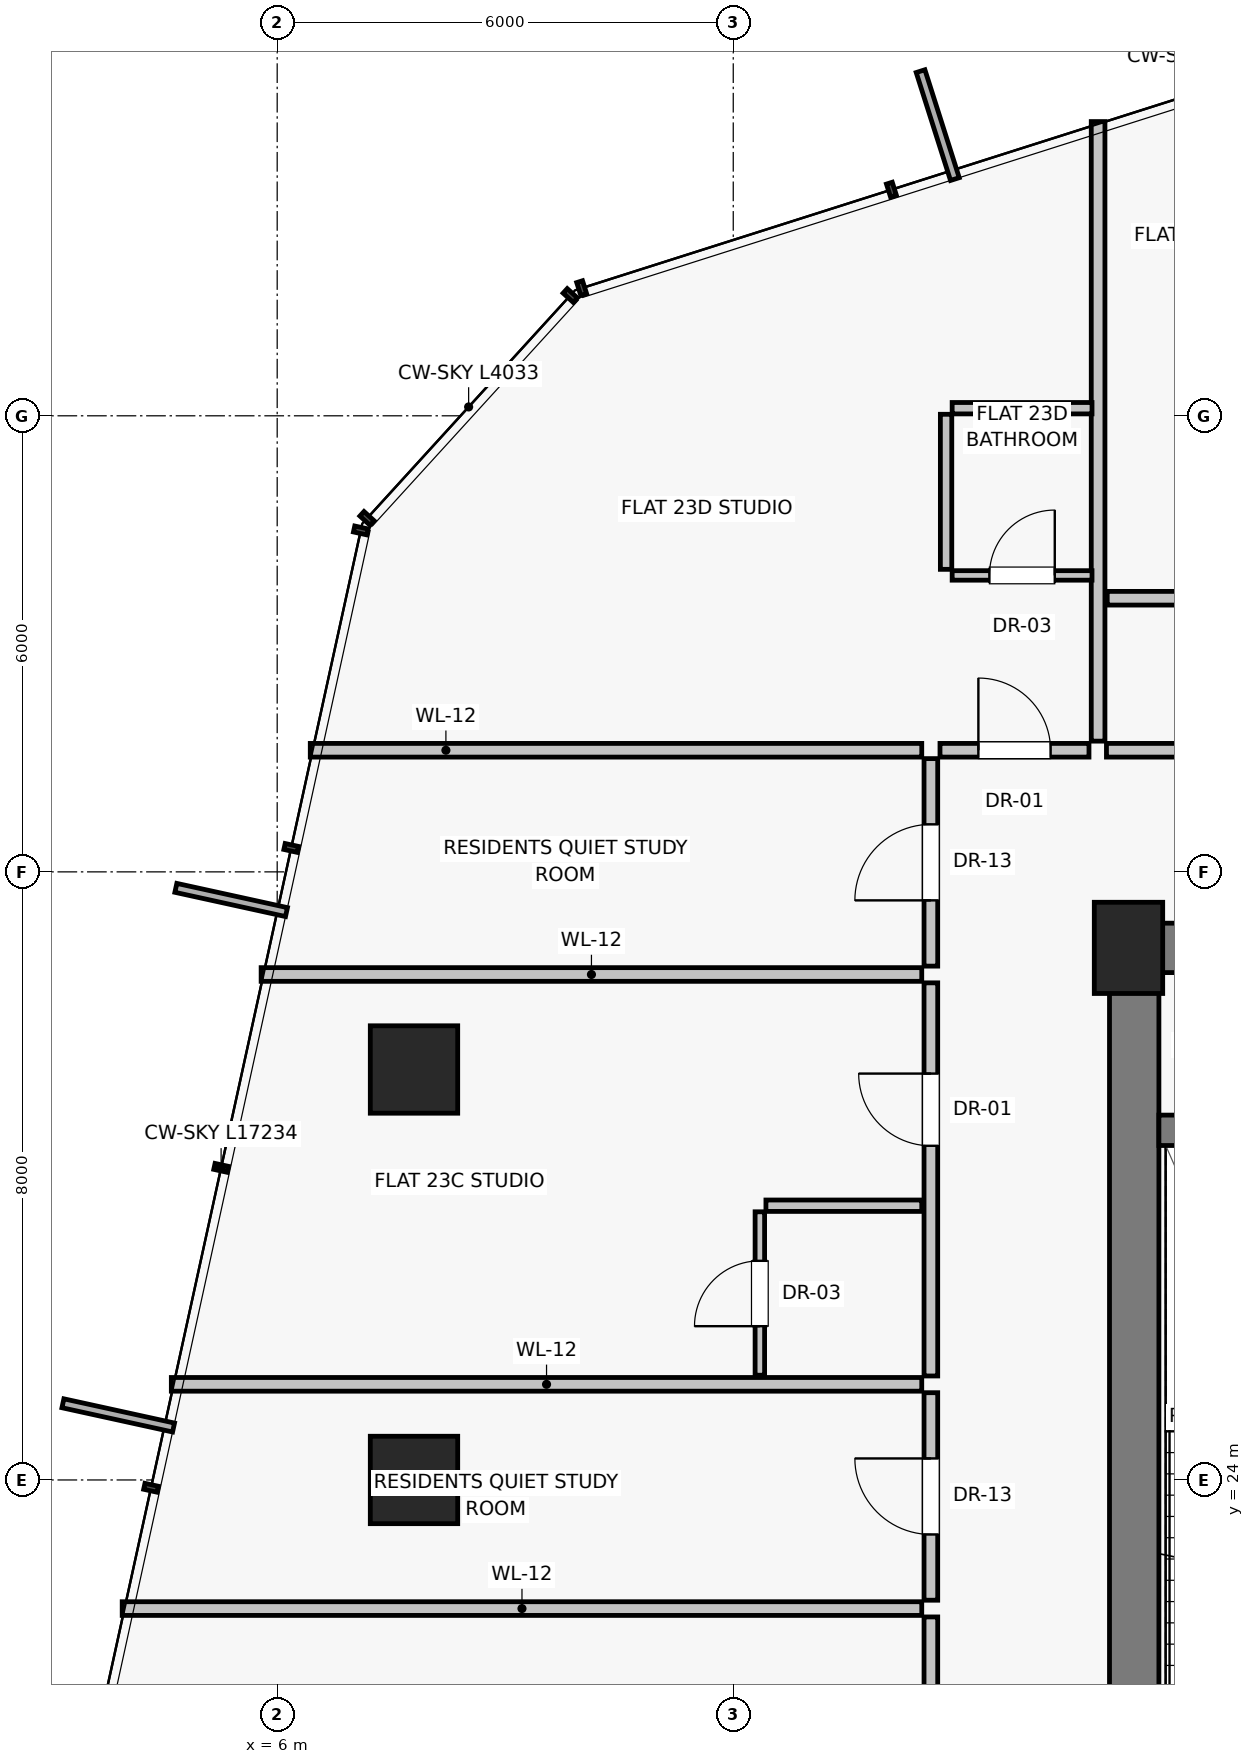
"""IFC4 building model, lengths in metres.
Left out: names, types, materials, properties, quantities, classifications, styles, units other than length and angle.
Written with IfcOpenShell. Run it as: python <this file> out.ifc"""

import sys

from ifc_helpers import new_model, si_unit, direction, frame, frame_2d, origin, origin_2d, place, context, subcontext, project, spatial, rectangle, extrude, source, transform, mapped, element, fill, save


model = new_model("IFC4")
c1 = context("Model", 3, precision=1e-05, world=origin(), true_north=direction((0.0, 1.0)))
c2 = subcontext(c1, "Body", "Model", "MODEL_VIEW")
j1 = project(units=[si_unit("LENGTHUNIT", "METRE"), si_unit("PLANEANGLEUNIT", "RADIAN")], contexts=[c1])
p1 = place(None, origin())
s1 = spatial("IfcSite", under=j1, at=p1, CompositionType="ELEMENT")
p2 = place(p1, origin())
s2 = spatial("IfcBuilding", under=s1, at=p2, CompositionType="ELEMENT")
p3 = place(p2, frame((0.0, 0.0, 85.15)))
s3 = spatial("IfcBuildingStorey", under=s2, at=p3, CompositionType="ELEMENT", Elevation=85.15)
p4 = place(p3, frame((17.2, 31.0, 0.0), z_axis=(0.0, 0.0, 1.0), x_axis=(1.0, 0.0, 0.0)))
e1 = element("IfcColumn", 1, at=p4, inside=s3, PredefinedType="PILASTER", context=c2, shape_type="SweptSolid", body=[
    extrude(rectangle(XDim=0.9, YDim=1.2, at=origin_2d()), origin(), (0.0, 0.0, 1.0), 4.3),
])
for number, where, z_axis, x_axis in (
    (2, (7.8, 29.4, -0.32), (0.0, 0.0, 1.0), (1.0, 0.0, 0.0)),
    (3, (7.8, 24.0, -0.32), (0.0, 0.0, 1.0), (1.0, 0.0, 0.0)),
):
    element("IfcColumn", number, at=place(p3, frame(where, z_axis=z_axis, x_axis=x_axis)), inside=s3, PredefinedType="COLUMN", context=c2, shape_type="SweptSolid", body=[
        extrude(rectangle(XDim=1.15, YDim=1.15, at=origin_2d()), origin(), (0.0, 0.0, 1.0), 4.62),
    ])
p5 = place(p3, frame((17.275, 16.8, 0.0), z_axis=(0.0, 0.0, 1.0), x_axis=(0.0, 1.0, 0.0)))
e4 = element("IfcWall", 4, at=p5, inside=s3, PredefinedType="SHEAR", context=c2, shape_type="SweptSolid", body=[
    extrude(rectangle(XDim=14.2, YDim=0.65, at=frame_2d((7.1, 0.0))), origin(), (0.0, 0.0, 1.0), 4.05),
])
p6 = place(p3, frame((17.2, 31.0, 0.0), z_axis=(0.0, 0.0, 1.0), x_axis=(1.0, 0.0, 0.0)))
e5 = element("IfcWall", 5, at=p6, inside=s3, PredefinedType="SHEAR", context=c2, shape_type="SweptSolid", body=[
    extrude(rectangle(XDim=3.8, YDim=0.65, at=frame_2d((1.9, 0.0))), origin(), (0.0, 0.0, 1.0), 4.05),
])
p7 = place(p6, frame((1.25, 0.0, 0.0)))
e6 = element("IfcOpeningElement", 6, at=p7, cuts=e5, PredefinedType="OPENING", context=c2, shape_type="SweptSolid", body=[
    extrude(rectangle(XDim=0.86, YDim=2.01, at=frame_2d((0.43, 1.005))), frame((0.0, 0.335, 0.0), z_axis=(0.0, -1.0, 0.0), x_axis=(1.0, 0.0, 0.0)), (0.0, 0.0, 1.0), 0.67),
])
p8 = place(p3, frame((17.6, 28.6, 0.0), z_axis=(0.0, 0.0, 1.0), x_axis=(1.0, 0.0, 0.0)))
e7 = element("IfcWall", 7, at=p8, inside=s3, PredefinedType="SHEAR", context=c2, shape_type="SweptSolid", body=[
    extrude(rectangle(XDim=3.4, YDim=0.4, at=frame_2d((1.7, 0.0))), origin(), (0.0, 0.0, 1.0), 4.05),
])
p9 = place(p3, frame((16.8, 33.72, 0.0), z_axis=(0.0, 0.0, 1.0), x_axis=(0.0, 1.0, 0.0)))
e8 = element("IfcWall", 8, at=p9, inside=s3, PredefinedType="PARTITIONING", context=c2, shape_type="SweptSolid", body=[
    extrude(rectangle(XDim=8.151, YDim=0.18, at=frame_2d((4.075, 0.0))), origin(), (0.0, 0.0, 1.0), 4.05),
])
p10 = place(p3, frame((16.91, 33.6, 0.0), z_axis=(0.0, 0.0, 1.0), x_axis=(1.0, 0.0, 0.0)))
e9 = element("IfcWall", 9, at=p10, inside=s3, PredefinedType="PARTITIONING", context=c2, shape_type="SweptSolid", body=[
    extrude(rectangle(XDim=4.1, YDim=0.18, at=frame_2d((2.05, 0.0))), origin(), (0.0, 0.0, 1.0), 4.05),
])
p11 = place(p10, frame((1.55, 0.0, 0.0)))
e10 = element("IfcOpeningElement", 10, at=p11, cuts=e9, PredefinedType="OPENING", context=c2, shape_type="SweptSolid", body=[
    extrude(rectangle(XDim=1.0, YDim=2.01, at=frame_2d((0.5, 1.005))), frame((0.0, 0.1, 0.0), z_axis=(0.0, -1.0, 0.0), x_axis=(1.0, 0.0, 0.0)), (0.0, 0.0, 1.0), 0.2),
])
p12 = place(p3, frame((16.92, 35.6, 0.0), z_axis=(0.0, 0.0, 1.0), x_axis=(1.0, 0.0, 0.0)))
e11 = element("IfcWall", 11, at=p12, inside=s3, PredefinedType="PARTITIONING", context=c2, shape_type="SweptSolid", body=[
    extrude(rectangle(XDim=4.1, YDim=0.18, at=frame_2d((2.05, 0.0))), origin(), (0.0, 0.0, 1.0), 3.63),
])
p13 = place(p3, frame((14.48, 33.6, 0.0), z_axis=(0.0, 0.0, 1.0), x_axis=(-1.0, 0.0, 0.0)))
e12 = element("IfcWall", 12, at=p13, inside=s3, PredefinedType="PARTITIONING", context=c2, shape_type="SweptSolid", body=[
    extrude(rectangle(XDim=8.045, YDim=0.18, at=frame_2d((4.022, 0.0))), origin(), (0.0, 0.0, 1.0), 4.05),
])
p14 = place(p3, frame((14.6, 22.418, 0.0), z_axis=(0.0, 0.0, 1.0), x_axis=(0.0, 1.0, 0.0)))
e13 = element("IfcWall", 13, at=p14, inside=s3, PredefinedType="PARTITIONING", context=c2, shape_type="SweptSolid", body=[
    extrude(rectangle(XDim=2.73, YDim=0.18, at=frame_2d((1.365, 0.0))), origin(), (0.0, 0.0, 1.0), 4.05),
])
p15 = place(p14, frame((0.865, 0.0, 0.0)))
e14 = element("IfcOpeningElement", 14, at=p15, cuts=e13, PredefinedType="OPENING", context=c2, shape_type="SweptSolid", body=[
    extrude(rectangle(XDim=1.0, YDim=2.01, at=frame_2d((0.5, 1.005))), frame((0.0, 0.1, 0.0), z_axis=(0.0, -1.0, 0.0), x_axis=(1.0, 0.0, 0.0)), (0.0, 0.0, 1.0), 0.2),
])
p16 = place(p3, frame((14.48, 22.308, 0.0), z_axis=(0.0, 0.0, 1.0), x_axis=(-1.0, 0.0, 0.0)))
e15 = element("IfcWall", 15, at=p16, inside=s3, PredefinedType="PARTITIONING", context=c2, shape_type="SweptSolid", body=[
    extrude(rectangle(XDim=10.519, YDim=0.18, at=frame_2d((5.26, 0.0))), origin(), (0.0, 0.0, 1.0), 4.05),
])
p17 = place(p3, frame((14.6, 14.31, 0.0), z_axis=(0.0, 0.0, 1.0), x_axis=(0.0, 1.0, 0.0)))
e16 = element("IfcWall", 16, at=p17, inside=s3, PredefinedType="PARTITIONING", context=c2, shape_type="SweptSolid", body=[
    extrude(rectangle(XDim=7.888, YDim=0.18, at=frame_2d((3.944, 0.0))), origin(), (0.0, 0.0, 1.0), 4.05),
])
p18 = place(p17, frame((5.038, 0.0, 0.0)))
e17 = element("IfcOpeningElement", 17, at=p18, cuts=e16, PredefinedType="OPENING", context=c2, shape_type="SweptSolid", body=[
    extrude(rectangle(XDim=0.95, YDim=2.02, at=frame_2d((0.475, 1.01))), frame((0.0, 0.1, 0.0), z_axis=(0.0, -1.0, 0.0), x_axis=(1.0, 0.0, 0.0)), (0.0, 0.0, 1.0), 0.2),
])
p19 = place(p3, frame((14.48, 25.258, 0.0), z_axis=(0.0, 0.0, 1.0), x_axis=(-1.0, 0.0, 0.0)))
e18 = element("IfcWall", 18, at=p19, inside=s3, PredefinedType="PARTITIONING", context=c2, shape_type="SweptSolid", body=[
    extrude(rectangle(XDim=9.873, YDim=0.18, at=frame_2d((4.936, 0.0))), origin(), (0.0, 0.0, 1.0), 4.05),
])
p20 = place(p3, frame((14.6, 30.76, 0.0), z_axis=(0.0, 0.0, 1.0), x_axis=(0.0, 1.0, 0.0)))
e19 = element("IfcWall", 19, at=p20, inside=s3, PredefinedType="PARTITIONING", context=c2, shape_type="SweptSolid", body=[
    extrude(rectangle(XDim=2.73, YDim=0.18, at=frame_2d((1.365, 0.0))), origin(), (0.0, 0.0, 1.0), 4.05),
])
p21 = place(p20, frame((0.865, 0.0, 0.0)))
e20 = element("IfcOpeningElement", 20, at=p21, cuts=e19, PredefinedType="OPENING", context=c2, shape_type="SweptSolid", body=[
    extrude(rectangle(XDim=1.0, YDim=2.01, at=frame_2d((0.5, 1.005))), frame((0.0, 0.1, 0.0), z_axis=(0.0, -1.0, 0.0), x_axis=(1.0, 0.0, 0.0)), (0.0, 0.0, 1.0), 0.2),
])
p22 = place(p3, frame((14.48, 30.65, 0.0), z_axis=(0.0, 0.0, 1.0), x_axis=(-1.0, 0.0, 0.0)))
e21 = element("IfcWall", 21, at=p22, inside=s3, PredefinedType="PARTITIONING", context=c2, shape_type="SweptSolid", body=[
    extrude(rectangle(XDim=8.691, YDim=0.18, at=frame_2d((4.346, 0.0))), origin(), (0.0, 0.0, 1.0), 3.428),
])
p23 = place(p3, frame((14.6, 25.368, 0.0), z_axis=(0.0, 0.0, 1.0), x_axis=(0.0, 1.0, 0.0)))
e22 = element("IfcWall", 22, at=p23, inside=s3, PredefinedType="PARTITIONING", context=c2, shape_type="SweptSolid", body=[
    extrude(rectangle(XDim=5.172, YDim=0.18, at=frame_2d((2.586, 0.0))), origin(), (0.0, 0.0, 1.0), 4.05),
])
p24 = place(p23, frame((3.028, 0.0, 0.0)))
e23 = element("IfcOpeningElement", 23, at=p24, cuts=e22, PredefinedType="OPENING", context=c2, shape_type="SweptSolid", body=[
    extrude(rectangle(XDim=0.95, YDim=2.02, at=frame_2d((0.475, 1.01))), frame((0.0, 0.1, 0.0), z_axis=(0.0, -1.0, 0.0), x_axis=(1.0, 0.0, 0.0)), (0.0, 0.0, 1.0), 0.2),
])
p25 = place(p3, frame((14.48, 27.608, 0.0), z_axis=(0.0, 0.0, 1.0), x_axis=(-1.0, 0.0, 0.0)))
e24 = element("IfcWall", 24, at=p25, inside=s3, PredefinedType="PARTITIONING", context=c2, shape_type="SweptSolid", body=[
    extrude(rectangle(XDim=2.05, YDim=0.15, at=frame_2d((1.025, 0.0))), origin(), (0.0, 0.0, 1.0), 4.05),
])
p26 = place(p3, frame((12.35, 25.378, 0.0), z_axis=(0.0, 0.0, 1.0), x_axis=(0.0, 1.0, 0.0)))
e25 = element("IfcWall", 25, at=p26, inside=s3, PredefinedType="PARTITIONING", context=c2, shape_type="SweptSolid", body=[
    extrude(rectangle(XDim=2.15, YDim=0.125, at=frame_2d((1.075, 0.0))), origin(), (0.0, 0.0, 1.0), 3.63),
])
p27 = place(p26, frame((0.645, 0.0, 0.0)))
e26 = element("IfcOpeningElement", 26, at=p27, cuts=e25, PredefinedType="OPENING", context=c2, shape_type="SweptSolid", body=[
    extrude(rectangle(XDim=0.86, YDim=2.01, at=frame_2d((0.43, 1.005))), frame((0.0, 0.073, 0.0), z_axis=(0.0, -1.0, 0.0), x_axis=(1.0, 0.0, 0.0)), (0.0, 0.0, 1.0), 0.145),
])
p28 = place(p3, frame((14.72, 33.6, 0.0), z_axis=(0.0, 0.0, 1.0), x_axis=(1.0, 0.0, 0.0)))
e27 = element("IfcWall", 27, at=p28, inside=s3, PredefinedType="PARTITIONING", context=c2, shape_type="SweptSolid", body=[
    extrude(rectangle(XDim=1.96, YDim=0.18, at=frame_2d((0.98, 0.0))), origin(), (0.0, 0.0, 1.0), 4.05),
])
p29 = place(p28, frame((0.505, 0.0, 0.0)))
e28 = element("IfcOpeningElement", 28, at=p29, cuts=e27, PredefinedType="OPENING", context=c2, shape_type="SweptSolid", body=[
    extrude(rectangle(XDim=0.95, YDim=2.02, at=frame_2d((0.475, 1.01))), frame((0.0, 0.1, 0.0), z_axis=(0.0, -1.0, 0.0), x_axis=(1.0, 0.0, 0.0)), (0.0, 0.0, 1.0), 0.2),
])
p30 = place(p3, frame((14.88, 35.9, 0.0), z_axis=(0.0, 0.0, 1.0), x_axis=(1.0, 0.0, 0.0)))
e29 = element("IfcWall", 29, at=p30, inside=s3, PredefinedType="PARTITIONING", context=c2, shape_type="SweptSolid", body=[
    extrude(rectangle(XDim=1.84, YDim=0.125, at=frame_2d((0.92, 0.0))), origin(), (0.0, 0.0, 1.0), 4.05),
])
p31 = place(p30, frame((0.49, 0.0, 0.0)))
e30 = element("IfcOpeningElement", 30, at=p31, cuts=e29, PredefinedType="OPENING", context=c2, shape_type="SweptSolid", body=[
    extrude(rectangle(XDim=0.86, YDim=2.01, at=frame_2d((0.43, 1.005))), frame((0.0, 0.073, 0.0), z_axis=(0.0, -1.0, 0.0), x_axis=(1.0, 0.0, 0.0)), (0.0, 0.0, 1.0), 0.145),
])
p32 = place(p3, frame((14.88, 38.1, 0.0), z_axis=(0.0, 0.0, 1.0), x_axis=(1.0, 0.0, 0.0)))
e31 = element("IfcWall", 31, at=p32, inside=s3, PredefinedType="PARTITIONING", context=c2, shape_type="SweptSolid", body=[
    extrude(rectangle(XDim=1.84, YDim=0.15, at=frame_2d((0.92, 0.0))), origin(), (0.0, 0.0, 1.0), 4.05),
])
p33 = place(p3, frame((14.8, 35.98, 0.0), z_axis=(0.0, 0.0, 1.0), x_axis=(0.0, 1.0, 0.0)))
e32 = element("IfcWall", 32, at=p33, inside=s3, PredefinedType="PARTITIONING", context=c2, shape_type="SweptSolid", body=[
    extrude(rectangle(XDim=2.04, YDim=0.15, at=frame_2d((1.02, 0.0))), origin(), (0.0, 0.0, 1.0), 4.05),
])
m1 = source(origin(), c2, "Body", "SweptSolid", [
    extrude(rectangle(XDim=1.0, YDim=2.01, at=frame_2d((0.5, 1.005))), frame((0.0, 0.025, 0.0), z_axis=(0.0, -1.0, 0.0), x_axis=(1.0, 0.0, 0.0)), (0.0, 0.0, 1.0), 0.05),
])
p34 = place(p15, origin())
e33 = element("IfcDoor", 33, at=p34, inside=s3, OperationType="SINGLE_SWING_RIGHT", PredefinedType="DOOR", context=c2, shape_type="MappedRepresentation", body=[
    mapped(m1, transform((0.0, 0.0, 0.0), scale=1.0)),
])
fill(e14, e33)
p35 = place(p21, origin())
e34 = element("IfcDoor", 34, at=p35, inside=s3, OperationType="SINGLE_SWING_LEFT", PredefinedType="DOOR", context=c2, shape_type="MappedRepresentation", body=[
    mapped(m1, transform((0.0, 0.0, 0.0), scale=1.0)),
])
fill(e20, e34)
m2 = source(origin(), c2, "Body", "SweptSolid", [
    extrude(rectangle(XDim=0.95, YDim=2.02, at=frame_2d((0.475, 1.01))), frame((0.0, 0.025, 0.0), z_axis=(0.0, -1.0, 0.0), x_axis=(1.0, 0.0, 0.0)), (0.0, 0.0, 1.0), 0.05),
])
p36 = place(p24, origin())
e35 = element("IfcDoor", 35, at=p36, inside=s3, OperationType="SINGLE_SWING_RIGHT", PredefinedType="DOOR", context=c2, shape_type="MappedRepresentation", body=[
    mapped(m2, transform((0.0, 0.0, 0.0), scale=1.0)),
])
fill(e23, e35)
m3 = source(origin(), c2, "Body", "SweptSolid", [
    extrude(rectangle(XDim=0.86, YDim=2.01, at=frame_2d((0.43, 1.005))), frame((0.0, 0.025, 0.0), z_axis=(0.0, -1.0, 0.0), x_axis=(1.0, 0.0, 0.0)), (0.0, 0.0, 1.0), 0.05),
])
p37 = place(p27, origin())
e36 = element("IfcDoor", 36, at=p37, inside=s3, OperationType="SINGLE_SWING_LEFT", PredefinedType="DOOR", context=c2, shape_type="MappedRepresentation", body=[
    mapped(m3, transform((0.0, 0.0, 0.0), scale=1.0)),
])
fill(e26, e36)
p38 = place(p29, origin())
e37 = element("IfcDoor", 37, at=p38, inside=s3, OperationType="SINGLE_SWING_LEFT", PredefinedType="DOOR", context=c2, shape_type="MappedRepresentation", body=[
    mapped(m2, transform((0.0, 0.0, 0.0), scale=1.0)),
])
fill(e28, e37)
p39 = place(p31, origin())
e38 = element("IfcDoor", 38, at=p39, inside=s3, OperationType="SINGLE_SWING_RIGHT", PredefinedType="DOOR", context=c2, shape_type="MappedRepresentation", body=[
    mapped(m3, transform((0.0, 0.0, 0.0), scale=1.0)),
])
fill(e30, e38)
save(model, sys.argv[1])
